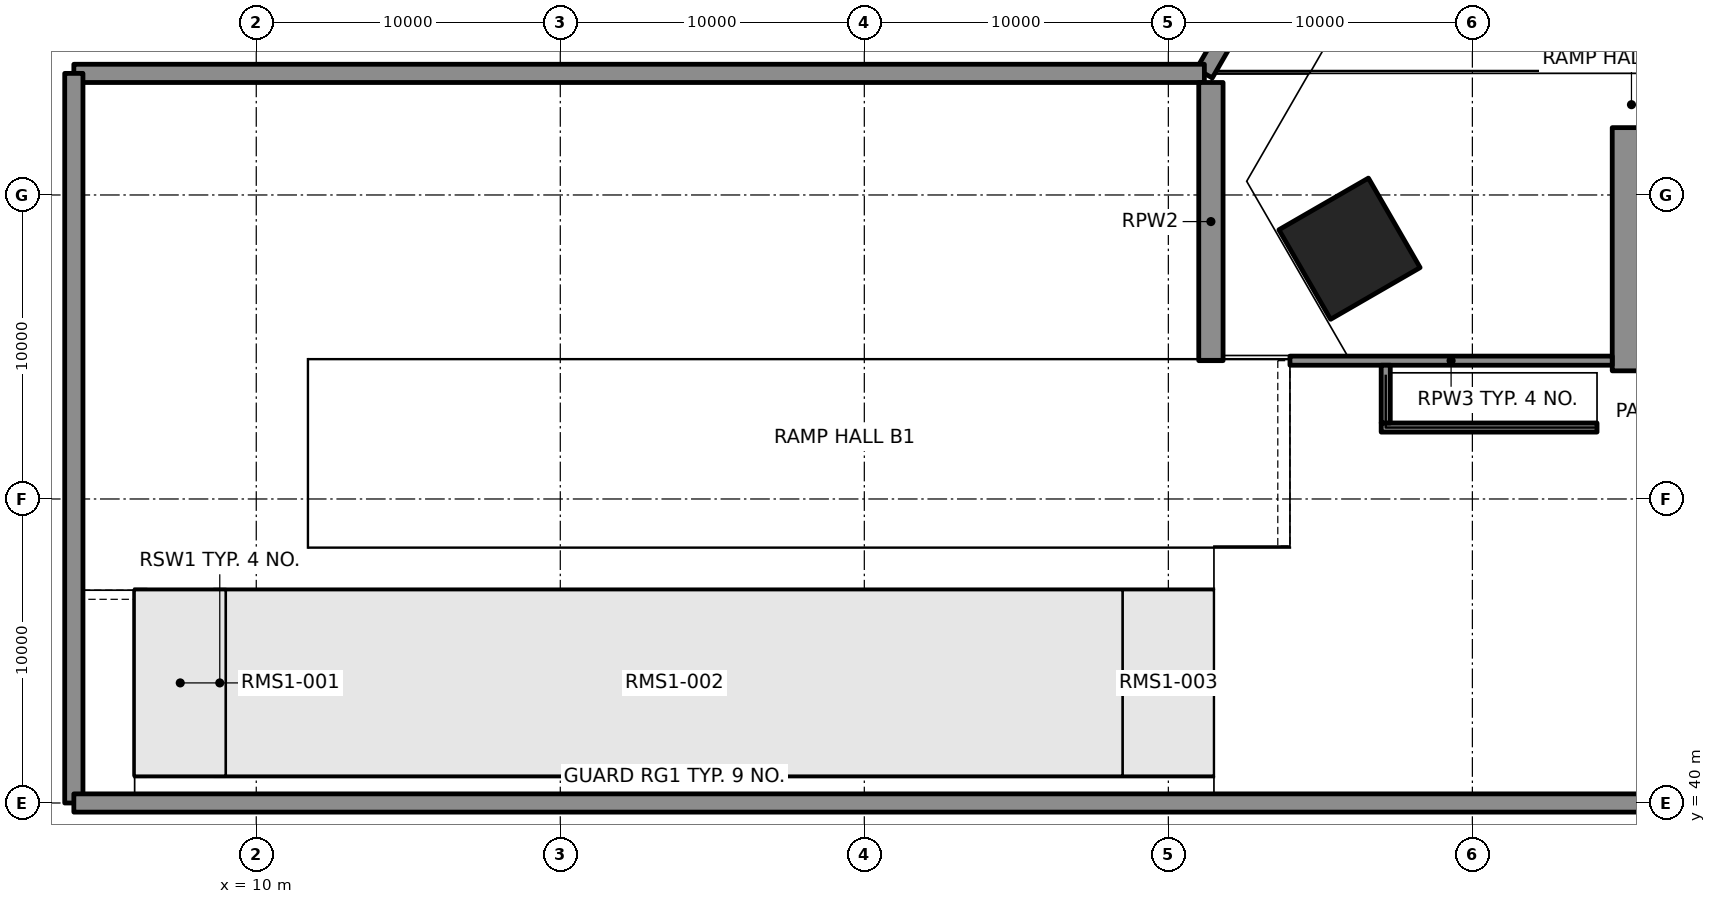
"""IFC4 building model, lengths in metres.
Left out: names, types, materials, properties, quantities, classifications, styles, units other than length and angle.
Written with IfcOpenShell. Run it as: python <this file> out.ifc"""

import sys

from ifc_helpers import new_model, si_unit, direction, frame, frame_2d, origin, origin_2d, place, context, subcontext, project, spatial, polyline, rectangle, outline, extrude, element, save


model = new_model("IFC4")
c1 = context("Model", 3, precision=1e-05, world=origin(), true_north=direction((0.0, 1.0)))
c2 = subcontext(c1, "Body", "Model", "MODEL_VIEW")
j1 = project(units=[si_unit("LENGTHUNIT", "METRE"), si_unit("PLANEANGLEUNIT", "RADIAN")], contexts=[c1])
p1 = place(None, origin())
s1 = spatial("IfcSite", under=j1, at=p1, CompositionType="ELEMENT")
p2 = place(p1, origin())
s2 = spatial("IfcBuilding", under=s1, at=p2, CompositionType="ELEMENT")
p3 = place(p2, frame((0.0, 0.0, -5.0)))
s3 = spatial("IfcBuildingStorey", under=s2, at=p3, CompositionType="ELEMENT", Elevation=-5.0)
p4 = place(p3, frame((67.936, 110.334, -0.35), z_axis=(0.0, 0.0, 1.0), x_axis=(-0.499999089162, -0.866025929656, 0.0)))
e1 = element("IfcWall", 1, at=p4, inside=s3, PredefinedType="SOLIDWALL", context=c2, shape_type="SweptSolid", body=[
    extrude(rectangle(XDim=53.501, YDim=0.6, at=frame_2d((26.751, 0.0))), origin(), (0.0, 0.0, 1.0), 5.05),
])
p5 = place(p3, frame((41.185, 64.0, -0.35), z_axis=(0.0, 0.0, 1.0), x_axis=(-1.0, 0.0, 0.0)))
e2 = element("IfcWall", 2, at=p5, inside=s3, PredefinedType="SOLIDWALL", context=c2, shape_type="SweptSolid", body=[
    extrude(rectangle(XDim=37.185, YDim=0.6, at=frame_2d((18.593, 0.0))), origin(), (0.0, 0.0, 1.0), 5.05),
])
p6 = place(p3, frame((4.0, 64.0, -0.35), z_axis=(0.0, 0.0, 1.0), x_axis=(0.0, -1.0, 0.0)))
e3 = element("IfcWall", 3, at=p6, inside=s3, PredefinedType="SOLIDWALL", context=c2, shape_type="SweptSolid", body=[
    extrude(rectangle(XDim=24.0, YDim=0.6, at=frame_2d((12.0, 0.0))), origin(), (0.0, 0.0, 1.0), 5.05),
])
p7 = place(p3, frame((4.0, 40.0, -0.35), z_axis=(0.0, 0.0, 1.0), x_axis=(1.0, 0.0, 0.0)))
e4 = element("IfcWall", 4, at=p7, inside=s3, PredefinedType="SOLIDWALL", context=c2, shape_type="SweptSolid", body=[
    extrude(rectangle(XDim=52.0, YDim=0.6, at=frame_2d((26.0, 0.0))), origin(), (0.0, 0.0, 1.0), 5.05),
])
p8 = place(p3, frame((55.8, 54.215, -0.35), z_axis=(0.0, 0.0, 1.0), x_axis=(0.0, 1.0, 0.0)))
e5 = element("IfcWall", 5, at=p8, inside=s3, PredefinedType="SHEAR", context=c2, shape_type="SweptSolid", body=[
    extrude(rectangle(XDim=8.0, YDim=2.4, at=frame_2d((4.0, 0.0))), origin(), (0.0, 0.0, 1.0), 5.05),
])
p9 = place(p3, frame((45.959, 58.233, 0.0), z_axis=(0.0, 0.0, 1.0), x_axis=(0.5, -0.866025403784, 0.0)))
e6 = element("IfcColumn", 6, at=p9, inside=s3, PredefinedType="COLUMN", context=c2, shape_type="SweptSolid", body=[
    extrude(rectangle(XDim=3.4, YDim=3.4, at=origin_2d()), origin(), (0.0, 0.0, 1.0), 5.0),
])
p10 = place(p3, frame((8.8, 40.9, -0.35), z_axis=(0.0, 0.0, 1.0), x_axis=(0.0, 1.0, 0.0)))
e7 = element("IfcWall", 7, at=p10, inside=s3, PredefinedType="SOLIDWALL", context=c2, shape_type="SweptSolid", body=[
    extrude(rectangle(XDim=6.1, YDim=0.4, at=frame_2d((3.05, 0.0))), origin(), (0.0, 0.0, 1.0), 4.817),
])
p11 = place(p3, frame((38.3, 40.9, -0.35), z_axis=(0.0, 0.0, 1.0), x_axis=(0.0, 1.0, 0.0)))
e8 = element("IfcWall", 8, at=p11, inside=s3, PredefinedType="SOLIDWALL", context=c2, shape_type="SweptSolid", body=[
    extrude(rectangle(XDim=6.1, YDim=0.4, at=frame_2d((3.05, 0.0))), origin(), (0.0, 0.0, 1.0), 0.483),
])
p12 = place(p3, frame((6.0, 43.95, -0.35), z_axis=(0.0, 0.0, 1.0), x_axis=(1.0, 0.0, 0.0)))
e9 = element("IfcWall", 9, at=p12, inside=s3, PredefinedType="SOLIDWALL", context=c2, shape_type="SweptSolid", body=[
    extrude(outline(polyline([(0.0, 0.0), (0.4, 0.0), (0.4, 5.106), (0.0, 5.15), (0.0, 0.0)])), frame((0.0, 3.05, 0.0), z_axis=(0.0, -1.0, 0.0), x_axis=(1.0, 0.0, 0.0)), (0.0, 0.0, 1.0), 6.1),
])
p13 = place(p3, frame((43.6, 51.5, -0.35), z_axis=(0.0, 0.0, 1.0), x_axis=(1.0, 0.0, 0.0)))
e10 = element("IfcWall", 10, at=p13, inside=s3, PredefinedType="SOLIDWALL", context=c2, shape_type="SweptSolid", body=[
    extrude(outline(polyline([(0.0, 0.0), (0.4, 0.0), (0.4, 0.15), (0.0, 0.106), (0.0, 0.0)])), frame((0.0, 3.05, 0.0), z_axis=(0.0, -1.0, 0.0), x_axis=(1.0, 0.0, 0.0)), (0.0, 0.0, 1.0), 6.1),
])
p14 = place(p3, frame((41.4, 54.55, -0.431), z_axis=(0.0, 0.0, 1.0), x_axis=(0.0, 1.0, 0.0)))
e11 = element("IfcWall", 11, at=p14, inside=s3, PredefinedType="SOLIDWALL", context=c2, shape_type="SweptSolid", body=[
    extrude(rectangle(XDim=9.15, YDim=0.8, at=frame_2d((4.575, 0.0))), origin(), (0.0, 0.0, 1.0), 4.981),
])
p15 = place(p3, frame((44.0, 54.55, 0.0), z_axis=(0.0, 0.0, 1.0), x_axis=(1.0, 0.0, 0.0)))
e12 = element("IfcWall", 12, at=p15, inside=s3, PredefinedType="SOLIDWALL", context=c2, shape_type="SweptSolid", body=[
    extrude(rectangle(XDim=10.6, YDim=0.3, at=frame_2d((5.3, 0.0))), origin(), (0.0, 0.0, 1.0), 4.7),
])
p16 = place(p3, frame((47.0, 52.35, 0.0), z_axis=(0.0, 0.0, 1.0), x_axis=(1.0, 0.0, 0.0)))
e13 = element("IfcWall", 13, at=p16, inside=s3, PredefinedType="SOLIDWALL", context=c2, shape_type="SweptSolid", body=[
    extrude(rectangle(XDim=7.1, YDim=0.3, at=frame_2d((3.55, 0.0))), origin(), (0.0, 0.0, 1.0), 4.7),
])
p17 = place(p3, frame((47.15, 52.5, 0.0), z_axis=(0.0, 0.0, 1.0), x_axis=(0.0, 1.0, 0.0)))
e14 = element("IfcWall", 14, at=p17, inside=s3, PredefinedType="SOLIDWALL", context=c2, shape_type="SweptSolid", body=[
    extrude(rectangle(XDim=1.9, YDim=0.3, at=frame_2d((0.95, 0.0))), origin(), (0.0, 0.0, 1.0), 4.7),
])
p18 = place(p3, frame((4.3, 46.85, 4.85), z_axis=(0.0, 0.0, 1.0), x_axis=(1.0, 0.0, 0.0)))
e15 = element("IfcWall", 15, at=p18, inside=s3, PredefinedType="SOLIDWALL", context=c2, shape_type="SweptSolid", body=[
    extrude(rectangle(XDim=1.7, YDim=0.3, at=frame_2d((0.85, 0.0))), origin(), (0.0, 0.0, 1.0), 1.25),
])
save(model, sys.argv[1])
